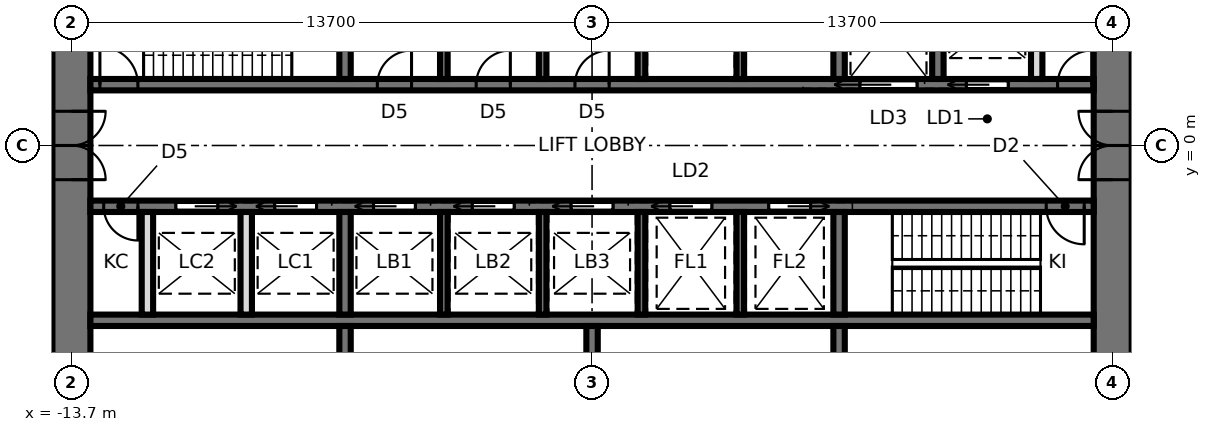
"""IFC4 building model, lengths in metres.
Left out: names, types, materials, properties, quantities, classifications, styles, units other than length and angle.
Written with IfcOpenShell. Run it as: python <this file> out.ifc"""

import sys

from ifc_helpers import new_model, si_unit, direction, frame, frame_2d, origin, place, context, subcontext, project, spatial, rectangle, extrude, element, fill, save


model = new_model("IFC4")
c1 = context("Model", 3, precision=1e-05, world=origin(), true_north=direction((0.0, 1.0)))
c2 = subcontext(c1, "Body", "Model", "MODEL_VIEW")
j1 = project(units=[si_unit("LENGTHUNIT", "METRE"), si_unit("PLANEANGLEUNIT", "RADIAN")], contexts=[c1])
p1 = place(None, origin())
s1 = spatial("IfcSite", under=j1, at=p1, CompositionType="ELEMENT")
p2 = place(p1, origin())
s2 = spatial("IfcBuilding", under=s1, at=p2, CompositionType="ELEMENT")
p3 = place(p2, frame((0.0, 0.0, 166.5)))
s3 = spatial("IfcBuildingStorey", under=s2, at=p3, CompositionType="ELEMENT", Elevation=166.5)
p4 = place(p3, frame((13.7, -9.5, 0.0), z_axis=(0.0, 0.0, 1.0), x_axis=(0.0, 1.0, 0.0)))
e1 = element("IfcWall", 1, at=p4, inside=s3, PredefinedType="SHEAR", context=c2, shape_type="SweptSolid", body=[
    extrude(rectangle(XDim=19.0, YDim=1.0, at=frame_2d((9.5, 0.0))), origin(), (0.0, 0.0, 1.0), 5.6),
])
p5 = place(p4, frame((8.6, 0.0, 0.0)))
e2 = element("IfcOpeningElement", 2, at=p5, cuts=e1, PredefinedType="OPENING", context=c2, shape_type="SweptSolid", body=[
    extrude(rectangle(XDim=1.8, YDim=2.4, at=frame_2d((0.9, 1.2))), frame((0.0, 0.51, 0.0), z_axis=(0.0, -1.0, 0.0), x_axis=(1.0, 0.0, 0.0)), (0.0, 0.0, 1.0), 1.02),
])
p6 = place(p3, frame((-13.7, 9.5, 0.0), z_axis=(0.0, 0.0, 1.0), x_axis=(0.0, -1.0, 0.0)))
e3 = element("IfcWall", 3, at=p6, inside=s3, PredefinedType="SHEAR", context=c2, shape_type="SweptSolid", body=[
    extrude(rectangle(XDim=19.0, YDim=1.0, at=frame_2d((9.5, 0.0))), origin(), (0.0, 0.0, 1.0), 5.6),
])
p7 = place(p6, frame((8.6, 0.0, 0.0)))
e4 = element("IfcOpeningElement", 4, at=p7, cuts=e3, PredefinedType="OPENING", context=c2, shape_type="SweptSolid", body=[
    extrude(rectangle(XDim=1.8, YDim=2.4, at=frame_2d((0.9, 1.2))), frame((0.0, 0.51, 0.0), z_axis=(0.0, -1.0, 0.0), x_axis=(1.0, 0.0, 0.0)), (0.0, 0.0, 1.0), 1.02),
])
p8 = place(p3, frame((-13.2, 1.6, 0.0), z_axis=(0.0, 0.0, 1.0), x_axis=(1.0, 0.0, 0.0)))
e5 = element("IfcWall", 5, at=p8, inside=s3, PredefinedType="SHEAR", context=c2, shape_type="SweptSolid", body=[
    extrude(rectangle(XDim=26.4, YDim=0.3, at=frame_2d((13.2, 0.0))), origin(), (0.0, 0.0, 1.0), 5.6),
])
p9 = place(p8, frame((0.25, 0.0, 0.0)))
e6 = element("IfcOpeningElement", 6, at=p9, cuts=e5, PredefinedType="OPENING", context=c2, shape_type="SweptSolid", body=[
    extrude(rectangle(XDim=1.0, YDim=2.1, at=frame_2d((0.5, 1.05))), frame((0.0, 0.16, 0.0), z_axis=(0.0, -1.0, 0.0), x_axis=(1.0, 0.0, 0.0)), (0.0, 0.0, 1.0), 0.32),
])
p10 = place(p8, frame((23.05, 0.0, 0.0)))
e7 = element("IfcOpeningElement", 7, at=p10, cuts=e5, PredefinedType="OPENING", context=c2, shape_type="SweptSolid", body=[
    extrude(rectangle(XDim=1.1, YDim=2.3, at=frame_2d((0.55, 1.15))), frame((0.0, 0.16, 0.0), z_axis=(0.0, -1.0, 0.0), x_axis=(1.0, 0.0, 0.0)), (0.0, 0.0, 1.0), 0.32),
])
p11 = place(p8, frame((20.25, 0.0, 0.0)))
e8 = element("IfcOpeningElement", 8, at=p11, cuts=e5, PredefinedType="OPENING", context=c2, shape_type="SweptSolid", body=[
    extrude(rectangle(XDim=1.5, YDim=2.4, at=frame_2d((0.75, 1.2))), frame((0.0, 0.16, 0.0), z_axis=(0.0, -1.0, 0.0), x_axis=(1.0, 0.0, 0.0)), (0.0, 0.0, 1.0), 0.32),
])
p12 = place(p8, frame((7.55, 0.0, 0.0)))
e9 = element("IfcOpeningElement", 9, at=p12, cuts=e5, PredefinedType="OPENING", context=c2, shape_type="SweptSolid", body=[
    extrude(rectangle(XDim=0.9, YDim=2.1, at=frame_2d((0.45, 1.05))), frame((0.0, 0.16, 0.0), z_axis=(0.0, -1.0, 0.0), x_axis=(1.0, 0.0, 0.0)), (0.0, 0.0, 1.0), 0.32),
])
p13 = place(p8, frame((10.15, 0.0, 0.0)))
e10 = element("IfcOpeningElement", 10, at=p13, cuts=e5, PredefinedType="OPENING", context=c2, shape_type="SweptSolid", body=[
    extrude(rectangle(XDim=0.9, YDim=2.1, at=frame_2d((0.45, 1.05))), frame((0.0, 0.16, 0.0), z_axis=(0.0, -1.0, 0.0), x_axis=(1.0, 0.0, 0.0)), (0.0, 0.0, 1.0), 0.32),
])
p14 = place(p8, frame((12.75, 0.0, 0.0)))
e11 = element("IfcOpeningElement", 11, at=p14, cuts=e5, PredefinedType="OPENING", context=c2, shape_type="SweptSolid", body=[
    extrude(rectangle(XDim=0.9, YDim=2.1, at=frame_2d((0.45, 1.05))), frame((0.0, 0.16, 0.0), z_axis=(0.0, -1.0, 0.0), x_axis=(1.0, 0.0, 0.0)), (0.0, 0.0, 1.0), 0.32),
])
p15 = place(p8, frame((25.45, 0.0, 0.0)))
e12 = element("IfcOpeningElement", 12, at=p15, cuts=e5, PredefinedType="OPENING", context=c2, shape_type="SweptSolid", body=[
    extrude(rectangle(XDim=0.9, YDim=2.1, at=frame_2d((0.45, 1.05))), frame((0.0, 0.16, 0.0), z_axis=(0.0, -1.0, 0.0), x_axis=(1.0, 0.0, 0.0)), (0.0, 0.0, 1.0), 0.32),
])
p16 = place(p3, frame((-13.2, -1.6, 0.0), z_axis=(0.0, 0.0, 1.0), x_axis=(1.0, 0.0, 0.0)))
e13 = element("IfcWall", 13, at=p16, inside=s3, PredefinedType="SHEAR", context=c2, shape_type="SweptSolid", body=[
    extrude(rectangle(XDim=26.4, YDim=0.3, at=frame_2d((13.2, 0.0))), origin(), (0.0, 0.0, 1.0), 5.6),
])
p17 = place(p16, frame((25.15, 0.0, 0.0)))
e14 = element("IfcOpeningElement", 14, at=p17, cuts=e13, PredefinedType="OPENING", context=c2, shape_type="SweptSolid", body=[
    extrude(rectangle(XDim=1.0, YDim=2.1, at=frame_2d((0.5, 1.05))), frame((0.0, 0.16, 0.0), z_axis=(0.0, -1.0, 0.0), x_axis=(1.0, 0.0, 0.0)), (0.0, 0.0, 1.0), 0.32),
])
p18 = place(p16, frame((7.45, 0.0, 0.0)))
e15 = element("IfcOpeningElement", 15, at=p18, cuts=e13, PredefinedType="OPENING", context=c2, shape_type="SweptSolid", body=[
    extrude(rectangle(XDim=1.1, YDim=2.3, at=frame_2d((0.55, 1.15))), frame((0.0, 0.16, 0.0), z_axis=(0.0, -1.0, 0.0), x_axis=(1.0, 0.0, 0.0)), (0.0, 0.0, 1.0), 0.32),
])
p19 = place(p16, frame((10.05, 0.0, 0.0)))
e16 = element("IfcOpeningElement", 16, at=p19, cuts=e13, PredefinedType="OPENING", context=c2, shape_type="SweptSolid", body=[
    extrude(rectangle(XDim=1.1, YDim=2.3, at=frame_2d((0.55, 1.15))), frame((0.0, 0.16, 0.0), z_axis=(0.0, -1.0, 0.0), x_axis=(1.0, 0.0, 0.0)), (0.0, 0.0, 1.0), 0.32),
])
p20 = place(p16, frame((12.65, 0.0, 0.0)))
e17 = element("IfcOpeningElement", 17, at=p20, cuts=e13, PredefinedType="OPENING", context=c2, shape_type="SweptSolid", body=[
    extrude(rectangle(XDim=1.1, YDim=2.3, at=frame_2d((0.55, 1.15))), frame((0.0, 0.16, 0.0), z_axis=(0.0, -1.0, 0.0), x_axis=(1.0, 0.0, 0.0)), (0.0, 0.0, 1.0), 0.32),
])
p21 = place(p16, frame((15.25, 0.0, 0.0)))
e18 = element("IfcOpeningElement", 18, at=p21, cuts=e13, PredefinedType="OPENING", context=c2, shape_type="SweptSolid", body=[
    extrude(rectangle(XDim=1.1, YDim=2.3, at=frame_2d((0.55, 1.15))), frame((0.0, 0.16, 0.0), z_axis=(0.0, -1.0, 0.0), x_axis=(1.0, 0.0, 0.0)), (0.0, 0.0, 1.0), 0.32),
])
p22 = place(p16, frame((17.85, 0.0, 0.0)))
e19 = element("IfcOpeningElement", 19, at=p22, cuts=e13, PredefinedType="OPENING", context=c2, shape_type="SweptSolid", body=[
    extrude(rectangle(XDim=1.1, YDim=2.3, at=frame_2d((0.55, 1.15))), frame((0.0, 0.16, 0.0), z_axis=(0.0, -1.0, 0.0), x_axis=(1.0, 0.0, 0.0)), (0.0, 0.0, 1.0), 0.32),
])
p23 = place(p16, frame((4.85, 0.0, 0.0)))
e20 = element("IfcOpeningElement", 20, at=p23, cuts=e13, PredefinedType="OPENING", context=c2, shape_type="SweptSolid", body=[
    extrude(rectangle(XDim=1.1, YDim=2.3, at=frame_2d((0.55, 1.15))), frame((0.0, 0.16, 0.0), z_axis=(0.0, -1.0, 0.0), x_axis=(1.0, 0.0, 0.0)), (0.0, 0.0, 1.0), 0.32),
])
p24 = place(p16, frame((2.25, 0.0, 0.0)))
e21 = element("IfcOpeningElement", 21, at=p24, cuts=e13, PredefinedType="OPENING", context=c2, shape_type="SweptSolid", body=[
    extrude(rectangle(XDim=1.1, YDim=2.3, at=frame_2d((0.55, 1.15))), frame((0.0, 0.16, 0.0), z_axis=(0.0, -1.0, 0.0), x_axis=(1.0, 0.0, 0.0)), (0.0, 0.0, 1.0), 0.32),
])
p25 = place(p16, frame((0.35, 0.0, 0.0)))
e22 = element("IfcOpeningElement", 22, at=p25, cuts=e13, PredefinedType="OPENING", context=c2, shape_type="SweptSolid", body=[
    extrude(rectangle(XDim=0.9, YDim=2.1, at=frame_2d((0.45, 1.05))), frame((0.0, 0.16, 0.0), z_axis=(0.0, -1.0, 0.0), x_axis=(1.0, 0.0, 0.0)), (0.0, 0.0, 1.0), 0.32),
])
p26 = place(p3, frame((-13.2, -4.6, 0.0), z_axis=(0.0, 0.0, 1.0), x_axis=(1.0, 0.0, 0.0)))
e23 = element("IfcWall", 23, at=p26, inside=s3, PredefinedType="SHEAR", context=c2, shape_type="SweptSolid", body=[
    extrude(rectangle(XDim=26.4, YDim=0.3, at=frame_2d((13.2, 0.0))), origin(), (0.0, 0.0, 1.0), 5.6),
])
for number, where, z_axis, x_axis in (
    (24, (-6.5, 1.75, 0.0), (0.0, 0.0, 1.0), (0.0, 1.0, 0.0)),
    (25, (6.5, 1.75, 0.0), (0.0, 0.0, 1.0), (0.0, 1.0, 0.0)),
):
    element("IfcWall", number, at=place(p3, frame(where, z_axis=z_axis, x_axis=x_axis)), inside=s3, PredefinedType="SHEAR", context=c2, shape_type="SweptSolid", body=[
        extrude(rectangle(XDim=2.7, YDim=0.3, at=frame_2d((1.35, 0.0))), origin(), (0.0, 0.0, 1.0), 5.6),
    ])
for number, where, z_axis, x_axis in (
    (26, (-3.9, 1.75, 0.0), (0.0, 0.0, 1.0), (0.0, 1.0, 0.0)),
    (27, (-1.3, 1.75, 0.0), (0.0, 0.0, 1.0), (0.0, 1.0, 0.0)),
    (28, (1.3, 1.75, 0.0), (0.0, 0.0, 1.0), (0.0, 1.0, 0.0)),
    (29, (3.9, 1.75, 0.0), (0.0, 0.0, 1.0), (0.0, 1.0, 0.0)),
):
    element("IfcWall", number, at=place(p3, frame(where, z_axis=z_axis, x_axis=x_axis)), inside=s3, PredefinedType="SHEAR", context=c2, shape_type="SweptSolid", body=[
        extrude(rectangle(XDim=2.7, YDim=0.2, at=frame_2d((1.35, 0.0))), origin(), (0.0, 0.0, 1.0), 5.6),
    ])
p27 = place(p3, frame((-6.5, -1.75, 0.0), z_axis=(0.0, 0.0, 1.0), x_axis=(0.0, -1.0, 0.0)))
e30 = element("IfcWall", 30, at=p27, inside=s3, PredefinedType="SHEAR", context=c2, shape_type="SweptSolid", body=[
    extrude(rectangle(XDim=2.7, YDim=0.3, at=frame_2d((1.35, 0.0))), origin(), (0.0, 0.0, 1.0), 5.6),
])
p28 = place(p3, frame((-6.5, -4.75, 0.0), z_axis=(0.0, 0.0, 1.0), x_axis=(0.0, -1.0, 0.0)))
e31 = element("IfcWall", 31, at=p28, inside=s3, PredefinedType="SHEAR", context=c2, shape_type="SweptSolid", body=[
    extrude(rectangle(XDim=3.75, YDim=0.3, at=frame_2d((1.875, 0.0))), origin(), (0.0, 0.0, 1.0), 5.6),
])
p29 = place(p3, frame((6.5, -1.75, 0.0), z_axis=(0.0, 0.0, 1.0), x_axis=(0.0, -1.0, 0.0)))
e32 = element("IfcWall", 32, at=p29, inside=s3, PredefinedType="SHEAR", context=c2, shape_type="SweptSolid", body=[
    extrude(rectangle(XDim=2.7, YDim=0.3, at=frame_2d((1.35, 0.0))), origin(), (0.0, 0.0, 1.0), 5.6),
])
p30 = place(p3, frame((6.5, -4.75, 0.0), z_axis=(0.0, 0.0, 1.0), x_axis=(0.0, -1.0, 0.0)))
e33 = element("IfcWall", 33, at=p30, inside=s3, PredefinedType="SHEAR", context=c2, shape_type="SweptSolid", body=[
    extrude(rectangle(XDim=3.75, YDim=0.3, at=frame_2d((1.875, 0.0))), origin(), (0.0, 0.0, 1.0), 5.6),
])
for number, where, z_axis, x_axis in (
    (34, (-3.9, -1.75, 0.0), (0.0, 0.0, 1.0), (0.0, -1.0, 0.0)),
    (35, (-1.3, -1.75, 0.0), (0.0, 0.0, 1.0), (0.0, -1.0, 0.0)),
    (36, (1.3, -1.75, 0.0), (0.0, 0.0, 1.0), (0.0, -1.0, 0.0)),
    (37, (3.9, -1.75, 0.0), (0.0, 0.0, 1.0), (0.0, -1.0, 0.0)),
):
    element("IfcWall", number, at=place(p3, frame(where, z_axis=z_axis, x_axis=x_axis)), inside=s3, PredefinedType="SHEAR", context=c2, shape_type="SweptSolid", body=[
        extrude(rectangle(XDim=2.7, YDim=0.2, at=frame_2d((1.35, 0.0))), origin(), (0.0, 0.0, 1.0), 5.6),
    ])
p31 = place(p3, frame((0.0, -4.75, 0.0), z_axis=(0.0, 0.0, 1.0), x_axis=(0.0, -1.0, 0.0)))
e38 = element("IfcWall", 38, at=p31, inside=s3, PredefinedType="SHEAR", context=c2, shape_type="SweptSolid", body=[
    extrude(rectangle(XDim=3.75, YDim=0.3, at=frame_2d((1.875, 0.0))), origin(), (0.0, 0.0, 1.0), 5.6),
])
p32 = place(p3, frame((9.1, 1.75, 0.0), z_axis=(0.0, 0.0, 1.0), x_axis=(0.0, 1.0, 0.0)))
e39 = element("IfcWall", 39, at=p32, inside=s3, PredefinedType="SHEAR", context=c2, shape_type="SweptSolid", body=[
    extrude(rectangle(XDim=2.7, YDim=0.3, at=frame_2d((1.35, 0.0))), origin(), (0.0, 0.0, 1.0), 5.6),
])
for number, where, z_axis, x_axis in (
    (40, (-9.1, -1.75, 0.0), (0.0, 0.0, 1.0), (0.0, -1.0, 0.0)),
    (41, (-11.7, -1.75, 0.0), (0.0, 0.0, 1.0), (0.0, -1.0, 0.0)),
    (42, (11.7, 1.75, 0.0), (0.0, 0.0, 1.0), (0.0, 1.0, 0.0)),
):
    element("IfcWall", number, at=place(p3, frame(where, z_axis=z_axis, x_axis=x_axis)), inside=s3, PredefinedType="SOLIDWALL", context=c2, shape_type="SweptSolid", body=[
        extrude(rectangle(XDim=2.7, YDim=0.3, at=frame_2d((1.35, 0.0))), origin(), (0.0, 0.0, 1.0), 5.4),
    ])
p33 = place(p7, origin())
e43 = element("IfcDoor", 43, at=p33, inside=s3, OperationType="DOUBLE_DOOR_SINGLE_SWING", PredefinedType="DOOR", context=c2, shape_type="SweptSolid", body=[
    extrude(rectangle(XDim=1.72, YDim=2.36, at=frame_2d((0.9, 1.18))), frame((0.0, 0.025, 0.0), z_axis=(0.0, -1.0, 0.0), x_axis=(1.0, 0.0, 0.0)), (0.0, 0.0, 1.0), 0.05),
    extrude(rectangle(XDim=0.04, YDim=2.4, at=frame_2d((0.02, 1.2))), frame((0.0, 0.25, 0.0), z_axis=(0.0, -1.0, 0.0), x_axis=(1.0, 0.0, 0.0)), (0.0, 0.0, 1.0), 0.5),
    extrude(rectangle(XDim=0.04, YDim=2.4, at=frame_2d((1.78, 1.2))), frame((0.0, 0.25, 0.0), z_axis=(0.0, -1.0, 0.0), x_axis=(1.0, 0.0, 0.0)), (0.0, 0.0, 1.0), 0.5),
    extrude(rectangle(XDim=1.72, YDim=0.04, at=frame_2d((0.9, 2.38))), frame((0.0, 0.25, 0.0), z_axis=(0.0, -1.0, 0.0), x_axis=(1.0, 0.0, 0.0)), (0.0, 0.0, 1.0), 0.5),
])
fill(e4, e43)
p34 = place(p5, origin())
e44 = element("IfcDoor", 44, at=p34, inside=s3, OperationType="DOUBLE_DOOR_SINGLE_SWING", PredefinedType="DOOR", context=c2, shape_type="SweptSolid", body=[
    extrude(rectangle(XDim=1.72, YDim=2.36, at=frame_2d((0.9, 1.18))), frame((0.0, 0.025, 0.0), z_axis=(0.0, -1.0, 0.0), x_axis=(1.0, 0.0, 0.0)), (0.0, 0.0, 1.0), 0.05),
    extrude(rectangle(XDim=0.04, YDim=2.4, at=frame_2d((0.02, 1.2))), frame((0.0, 0.25, 0.0), z_axis=(0.0, -1.0, 0.0), x_axis=(1.0, 0.0, 0.0)), (0.0, 0.0, 1.0), 0.5),
    extrude(rectangle(XDim=0.04, YDim=2.4, at=frame_2d((1.78, 1.2))), frame((0.0, 0.25, 0.0), z_axis=(0.0, -1.0, 0.0), x_axis=(1.0, 0.0, 0.0)), (0.0, 0.0, 1.0), 0.5),
    extrude(rectangle(XDim=1.72, YDim=0.04, at=frame_2d((0.9, 2.38))), frame((0.0, 0.25, 0.0), z_axis=(0.0, -1.0, 0.0), x_axis=(1.0, 0.0, 0.0)), (0.0, 0.0, 1.0), 0.5),
])
fill(e2, e44)
p35 = place(p9, origin())
e45 = element("IfcDoor", 45, at=p35, inside=s3, OperationType="SINGLE_SWING_LEFT", PredefinedType="DOOR", context=c2, shape_type="SweptSolid", body=[
    extrude(rectangle(XDim=1.0, YDim=2.1, at=frame_2d((0.5, 1.05))), frame((0.0, 0.025, 0.0), z_axis=(0.0, -1.0, 0.0), x_axis=(1.0, 0.0, 0.0)), (0.0, 0.0, 1.0), 0.05),
])
fill(e6, e45)
p36 = place(p17, frame((1.0, 0.0, 0.0), z_axis=(0.0, 0.0, 1.0), x_axis=(-1.0, 0.0, 0.0)))
e46 = element("IfcDoor", 46, at=p36, inside=s3, OperationType="SINGLE_SWING_LEFT", PredefinedType="DOOR", context=c2, shape_type="SweptSolid", body=[
    extrude(rectangle(XDim=1.0, YDim=2.1, at=frame_2d((0.5, 1.05))), frame((0.0, 0.025, 0.0), z_axis=(0.0, -1.0, 0.0), x_axis=(1.0, 0.0, 0.0)), (0.0, 0.0, 1.0), 0.05),
])
fill(e14, e46)
p37 = place(p10, origin())
e47 = element("IfcDoor", 47, at=p37, inside=s3, OperationType="SLIDING_TO_LEFT", PredefinedType="DOOR", context=c2, shape_type="SweptSolid", body=[
    extrude(rectangle(XDim=1.1, YDim=2.3, at=frame_2d((0.55, 1.15))), frame((0.0, 0.025, 0.0), z_axis=(0.0, -1.0, 0.0), x_axis=(1.0, 0.0, 0.0)), (0.0, 0.0, 1.0), 0.05),
])
fill(e7, e47)
p38 = place(p11, origin())
e48 = element("IfcDoor", 48, at=p38, inside=s3, OperationType="SLIDING_TO_LEFT", PredefinedType="DOOR", context=c2, shape_type="SweptSolid", body=[
    extrude(rectangle(XDim=1.5, YDim=2.4, at=frame_2d((0.75, 1.2))), frame((0.0, 0.025, 0.0), z_axis=(0.0, -1.0, 0.0), x_axis=(1.0, 0.0, 0.0)), (0.0, 0.0, 1.0), 0.05),
])
fill(e8, e48)
p39 = place(p12, origin())
e49 = element("IfcDoor", 49, at=p39, inside=s3, OperationType="SINGLE_SWING_RIGHT", PredefinedType="DOOR", context=c2, shape_type="SweptSolid", body=[
    extrude(rectangle(XDim=0.9, YDim=2.1, at=frame_2d((0.45, 1.05))), frame((0.0, 0.025, 0.0), z_axis=(0.0, -1.0, 0.0), x_axis=(1.0, 0.0, 0.0)), (0.0, 0.0, 1.0), 0.05),
])
fill(e9, e49)
p40 = place(p13, origin())
e50 = element("IfcDoor", 50, at=p40, inside=s3, OperationType="SINGLE_SWING_RIGHT", PredefinedType="DOOR", context=c2, shape_type="SweptSolid", body=[
    extrude(rectangle(XDim=0.9, YDim=2.1, at=frame_2d((0.45, 1.05))), frame((0.0, 0.025, 0.0), z_axis=(0.0, -1.0, 0.0), x_axis=(1.0, 0.0, 0.0)), (0.0, 0.0, 1.0), 0.05),
])
fill(e10, e50)
p41 = place(p14, origin())
e51 = element("IfcDoor", 51, at=p41, inside=s3, OperationType="SINGLE_SWING_RIGHT", PredefinedType="DOOR", context=c2, shape_type="SweptSolid", body=[
    extrude(rectangle(XDim=0.9, YDim=2.1, at=frame_2d((0.45, 1.05))), frame((0.0, 0.025, 0.0), z_axis=(0.0, -1.0, 0.0), x_axis=(1.0, 0.0, 0.0)), (0.0, 0.0, 1.0), 0.05),
])
fill(e11, e51)
p42 = place(p18, frame((1.1, 0.0, 0.0), z_axis=(0.0, 0.0, 1.0), x_axis=(-1.0, 0.0, 0.0)))
e52 = element("IfcDoor", 52, at=p42, inside=s3, OperationType="SLIDING_TO_RIGHT", PredefinedType="DOOR", context=c2, shape_type="SweptSolid", body=[
    extrude(rectangle(XDim=1.1, YDim=2.3, at=frame_2d((0.55, 1.15))), frame((0.0, 0.025, 0.0), z_axis=(0.0, -1.0, 0.0), x_axis=(1.0, 0.0, 0.0)), (0.0, 0.0, 1.0), 0.05),
])
fill(e15, e52)
p43 = place(p19, frame((1.1, 0.0, 0.0), z_axis=(0.0, 0.0, 1.0), x_axis=(-1.0, 0.0, 0.0)))
e53 = element("IfcDoor", 53, at=p43, inside=s3, OperationType="SLIDING_TO_RIGHT", PredefinedType="DOOR", context=c2, shape_type="SweptSolid", body=[
    extrude(rectangle(XDim=1.1, YDim=2.3, at=frame_2d((0.55, 1.15))), frame((0.0, 0.025, 0.0), z_axis=(0.0, -1.0, 0.0), x_axis=(1.0, 0.0, 0.0)), (0.0, 0.0, 1.0), 0.05),
])
fill(e16, e53)
p44 = place(p20, frame((1.1, 0.0, 0.0), z_axis=(0.0, 0.0, 1.0), x_axis=(-1.0, 0.0, 0.0)))
e54 = element("IfcDoor", 54, at=p44, inside=s3, OperationType="SLIDING_TO_RIGHT", PredefinedType="DOOR", context=c2, shape_type="SweptSolid", body=[
    extrude(rectangle(XDim=1.1, YDim=2.3, at=frame_2d((0.55, 1.15))), frame((0.0, 0.025, 0.0), z_axis=(0.0, -1.0, 0.0), x_axis=(1.0, 0.0, 0.0)), (0.0, 0.0, 1.0), 0.05),
])
fill(e17, e54)
p45 = place(p21, frame((1.1, 0.0, 0.0), z_axis=(0.0, 0.0, 1.0), x_axis=(-1.0, 0.0, 0.0)))
e55 = element("IfcDoor", 55, at=p45, inside=s3, OperationType="SLIDING_TO_RIGHT", PredefinedType="DOOR", context=c2, shape_type="SweptSolid", body=[
    extrude(rectangle(XDim=1.1, YDim=2.3, at=frame_2d((0.55, 1.15))), frame((0.0, 0.025, 0.0), z_axis=(0.0, -1.0, 0.0), x_axis=(1.0, 0.0, 0.0)), (0.0, 0.0, 1.0), 0.05),
])
fill(e18, e55)
p46 = place(p22, frame((1.1, 0.0, 0.0), z_axis=(0.0, 0.0, 1.0), x_axis=(-1.0, 0.0, 0.0)))
e56 = element("IfcDoor", 56, at=p46, inside=s3, OperationType="SLIDING_TO_LEFT", PredefinedType="DOOR", context=c2, shape_type="SweptSolid", body=[
    extrude(rectangle(XDim=1.1, YDim=2.3, at=frame_2d((0.55, 1.15))), frame((0.0, 0.025, 0.0), z_axis=(0.0, -1.0, 0.0), x_axis=(1.0, 0.0, 0.0)), (0.0, 0.0, 1.0), 0.05),
])
fill(e19, e56)
p47 = place(p23, frame((1.1, 0.0, 0.0), z_axis=(0.0, 0.0, 1.0), x_axis=(-1.0, 0.0, 0.0)))
e57 = element("IfcDoor", 57, at=p47, inside=s3, OperationType="SLIDING_TO_RIGHT", PredefinedType="DOOR", context=c2, shape_type="SweptSolid", body=[
    extrude(rectangle(XDim=1.1, YDim=2.3, at=frame_2d((0.55, 1.15))), frame((0.0, 0.025, 0.0), z_axis=(0.0, -1.0, 0.0), x_axis=(1.0, 0.0, 0.0)), (0.0, 0.0, 1.0), 0.05),
])
fill(e20, e57)
p48 = place(p24, frame((1.1, 0.0, 0.0), z_axis=(0.0, 0.0, 1.0), x_axis=(-1.0, 0.0, 0.0)))
e58 = element("IfcDoor", 58, at=p48, inside=s3, OperationType="SLIDING_TO_LEFT", PredefinedType="DOOR", context=c2, shape_type="SweptSolid", body=[
    extrude(rectangle(XDim=1.1, YDim=2.3, at=frame_2d((0.55, 1.15))), frame((0.0, 0.025, 0.0), z_axis=(0.0, -1.0, 0.0), x_axis=(1.0, 0.0, 0.0)), (0.0, 0.0, 1.0), 0.05),
])
fill(e21, e58)
p49 = place(p15, origin())
e59 = element("IfcDoor", 59, at=p49, inside=s3, OperationType="SINGLE_SWING_RIGHT", PredefinedType="DOOR", context=c2, shape_type="SweptSolid", body=[
    extrude(rectangle(XDim=0.9, YDim=2.1, at=frame_2d((0.45, 1.05))), frame((0.0, 0.025, 0.0), z_axis=(0.0, -1.0, 0.0), x_axis=(1.0, 0.0, 0.0)), (0.0, 0.0, 1.0), 0.05),
])
fill(e12, e59)
p50 = place(p25, frame((0.9, 0.0, 0.0), z_axis=(0.0, 0.0, 1.0), x_axis=(-1.0, 0.0, 0.0)))
e60 = element("IfcDoor", 60, at=p50, inside=s3, OperationType="SINGLE_SWING_LEFT", PredefinedType="DOOR", context=c2, shape_type="SweptSolid", body=[
    extrude(rectangle(XDim=0.9, YDim=2.1, at=frame_2d((0.45, 1.05))), frame((0.0, 0.025, 0.0), z_axis=(0.0, -1.0, 0.0), x_axis=(1.0, 0.0, 0.0)), (0.0, 0.0, 1.0), 0.05),
])
fill(e22, e60)
save(model, sys.argv[1])
